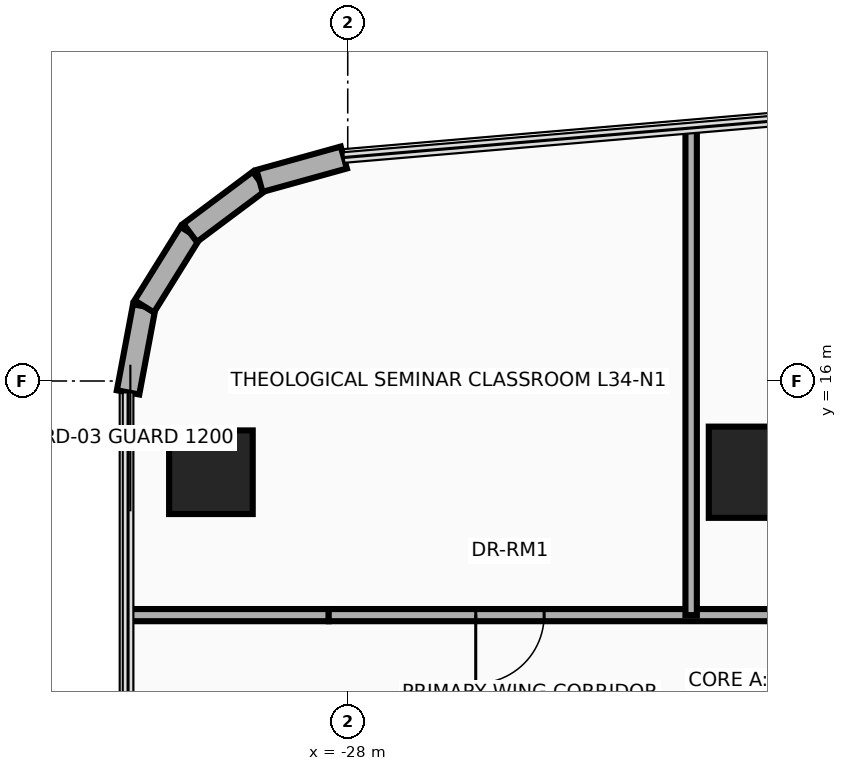
"""IFC4 building model, lengths in metres.
Left out: names, types, materials, properties, quantities, classifications, styles, units other than length and angle.
Written with IfcOpenShell. Run it as: python <this file> out.ifc"""

import sys

from ifc_helpers import new_model, si_unit, direction, frame, frame_2d, origin, origin_2d, place, context, subcontext, project, spatial, rectangle, circle, extrude, source, transform, mapped, element, fill, save


model = new_model("IFC4")
c1 = context("Model", 3, precision=1e-05, world=origin(), true_north=direction((0.0, 1.0)))
c2 = subcontext(c1, "Body", "Model", "MODEL_VIEW")
j1 = project(units=[si_unit("LENGTHUNIT", "METRE"), si_unit("PLANEANGLEUNIT", "RADIAN")], contexts=[c1])
p1 = place(None, origin())
s1 = spatial("IfcSite", under=j1, at=p1, CompositionType="ELEMENT")
p2 = place(p1, origin())
s2 = spatial("IfcBuilding", under=s1, at=p2, CompositionType="ELEMENT")
p3 = place(p2, frame((0.0, 0.0, 135.3)))
s3 = spatial("IfcBuildingStorey", under=s2, at=p3, CompositionType="ELEMENT", Elevation=135.3)
m1 = source(origin(), c2, "Body", "SweptSolid", [
    extrude(circle(Radius=0.55, at=origin_2d()), origin(), (0.0, 0.0, 1.0), 3.7),
])
p4 = place(p3, frame((-29.8, 14.8, 0.0), z_axis=(0.0, 0.0, 1.0), x_axis=(1.0, 0.0, 0.0)))
e1 = element("IfcColumn", 1, at=p4, inside=s3, PredefinedType="COLUMN", context=c2, shape_type="MappedRepresentation", body=[
    mapped(m1, transform((0.0, 0.0, 0.0), x_axis=(1.0, 0.0, 0.0), y_axis=(0.0, 1.0, 0.0), z_axis=(0.0, 0.0, 1.0), scale=1.0)),
])
m2 = source(origin(), c2, "Body", "SweptSolid", [
    extrude(rectangle(XDim=1.2, YDim=1.2, at=origin_2d()), origin(), (0.0, 0.0, 1.0), 3.7),
])
p5 = place(p3, frame((-22.65, 14.8, 0.0), z_axis=(0.0, 0.0, 1.0), x_axis=(1.0, 0.0, 0.0)))
e2 = element("IfcColumn", 2, at=p5, inside=s3, PredefinedType="COLUMN", context=c2, shape_type="MappedRepresentation", body=[
    mapped(m2, transform((0.0, 0.0, 0.0), x_axis=(1.0, 0.0, 0.0), y_axis=(0.0, 1.0, 0.0), z_axis=(0.0, 0.0, 1.0), scale=1.0)),
])
p6 = place(p3, frame((-30.89, 15.85, 0.0), z_axis=(0.0, 0.0, 1.0), x_axis=(0.184557499391, 0.982821718023, 0.0)))
e3 = element("IfcWall", 3, at=p6, inside=s3, PredefinedType="SOLIDWALL", context=c2, shape_type="SweptSolid", body=[
    extrude(rectangle(XDim=1.151, YDim=0.3, at=frame_2d((0.575, 0.0))), origin(), (0.0, 0.0, 1.0), 3.46),
])
p7 = place(p3, frame((-30.677, 16.981, 0.0), z_axis=(0.0, 0.0, 1.0), x_axis=(0.52880576008, 0.848742875143, 0.0)))
e4 = element("IfcWall", 4, at=p7, inside=s3, PredefinedType="SOLIDWALL", context=c2, shape_type="SweptSolid", body=[
    extrude(rectangle(XDim=1.141, YDim=0.3, at=frame_2d((0.57, 0.0))), origin(), (0.0, 0.0, 1.0), 3.46),
])
p8 = place(p3, frame((-30.074, 17.95, 0.0), z_axis=(0.0, 0.0, 1.0), x_axis=(0.800975009324, 0.598697782223, 0.0)))
e5 = element("IfcWall", 5, at=p8, inside=s3, PredefinedType="SOLIDWALL", context=c2, shape_type="SweptSolid", body=[
    extrude(rectangle(XDim=1.141, YDim=0.3, at=frame_2d((0.57, 0.0))), origin(), (0.0, 0.0, 1.0), 3.46),
])
p9 = place(p3, frame((-29.161, 18.633, 0.0), z_axis=(0.0, 0.0, 1.0), x_axis=(0.963624193367, 0.267260947313, 0.0)))
e6 = element("IfcWall", 6, at=p9, inside=s3, PredefinedType="SOLIDWALL", context=c2, shape_type="SweptSolid", body=[
    extrude(rectangle(XDim=1.151, YDim=0.3, at=frame_2d((0.575, 0.0))), origin(), (0.0, 0.0, 1.0), 3.46),
])
p10 = place(p3, frame((-30.89, 12.92, 0.0), z_axis=(0.0, 0.0, 1.0), x_axis=(1.0, 0.0, 0.0)))
e7 = element("IfcWall", 7, at=p10, inside=s3, PredefinedType="PARTITIONING", context=c2, shape_type="SweptSolid", body=[
    extrude(rectangle(XDim=2.64, YDim=0.16, at=frame_2d((1.32, 0.0))), origin(), (0.0, 0.0, 1.0), 2.896),
])
p11 = place(p3, frame((-28.25, 12.92, 0.0), z_axis=(0.0, 0.0, 1.0), x_axis=(1.0, 0.0, 0.0)))
e8 = element("IfcWall", 8, at=p11, inside=s3, PredefinedType="PARTITIONING", context=c2, shape_type="SweptSolid", body=[
    extrude(rectangle(XDim=41.8, YDim=0.16, at=frame_2d((20.9, 0.0))), origin(), (0.0, 0.0, 1.0), 2.666),
])
p12 = place(p11, frame((1.934, 0.0, 0.0)))
e9 = element("IfcOpeningElement", 9, at=p12, cuts=e8, PredefinedType="OPENING", context=c2, shape_type="SweptSolid", body=[
    extrude(rectangle(XDim=0.9, YDim=2.1, at=frame_2d((0.45, 1.05))), frame((0.0, 0.095, 0.0), z_axis=(0.0, -1.0, 0.0), x_axis=(1.0, 0.0, 0.0)), (0.0, 0.0, 1.0), 0.19),
])
p13 = place(p11, frame((8.497, 0.0, 0.0)))
e10 = element("IfcOpeningElement", 10, at=p13, cuts=e8, PredefinedType="OPENING", context=c2, shape_type="SweptSolid", body=[
    extrude(rectangle(XDim=1.8, YDim=2.15, at=frame_2d((0.9, 1.075))), frame((0.0, 0.095, 0.0), z_axis=(0.0, -1.0, 0.0), x_axis=(1.0, 0.0, 0.0)), (0.0, 0.0, 1.0), 0.19),
])
p14 = place(p11, frame((17.755, 0.0, 0.0)))
e11 = element("IfcOpeningElement", 11, at=p14, cuts=e8, PredefinedType="OPENING", context=c2, shape_type="SweptSolid", body=[
    extrude(rectangle(XDim=1.8, YDim=2.15, at=frame_2d((0.9, 1.075))), frame((0.0, 0.095, 0.0), z_axis=(0.0, -1.0, 0.0), x_axis=(1.0, 0.0, 0.0)), (0.0, 0.0, 1.0), 0.19),
])
p15 = place(p11, frame((27.013, 0.0, 0.0)))
e12 = element("IfcOpeningElement", 12, at=p15, cuts=e8, PredefinedType="OPENING", context=c2, shape_type="SweptSolid", body=[
    extrude(rectangle(XDim=1.8, YDim=2.15, at=frame_2d((0.9, 1.075))), frame((0.0, 0.095, 0.0), z_axis=(0.0, -1.0, 0.0), x_axis=(1.0, 0.0, 0.0)), (0.0, 0.0, 1.0), 0.19),
])
p16 = place(p11, frame((36.271, 0.0, 0.0)))
e13 = element("IfcOpeningElement", 13, at=p16, cuts=e8, PredefinedType="OPENING", context=c2, shape_type="SweptSolid", body=[
    extrude(rectangle(XDim=1.8, YDim=2.15, at=frame_2d((0.9, 1.075))), frame((0.0, 0.095, 0.0), z_axis=(0.0, -1.0, 0.0), x_axis=(1.0, 0.0, 0.0)), (0.0, 0.0, 1.0), 0.19),
])
p17 = place(p3, frame((-23.482, 12.92, 0.0), z_axis=(0.0, 0.0, 1.0), x_axis=(0.0, 1.0, 0.0)))
e14 = element("IfcWall", 14, at=p17, inside=s3, PredefinedType="PARTITIONING", context=c2, shape_type="SweptSolid", body=[
    extrude(rectangle(XDim=6.409, YDim=0.15, at=frame_2d((3.204, 0.0))), origin(), (0.0, 0.0, 1.0), 2.666),
])
p18 = place(p12, frame((0.9, 0.0, 0.0), z_axis=(0.0, 0.0, 1.0), x_axis=(-1.0, 0.0, 0.0)))
e15 = element("IfcDoor", 15, at=p18, inside=s3, OperationType="SINGLE_SWING_LEFT", PredefinedType="DOOR", context=c2, shape_type="SweptSolid", body=[
    extrude(rectangle(XDim=0.9, YDim=2.1, at=frame_2d((0.45, 1.05))), frame((0.0, 0.025, 0.0), z_axis=(0.0, -1.0, 0.0), x_axis=(1.0, 0.0, 0.0)), (0.0, 0.0, 1.0), 0.05),
])
fill(e9, e15)
save(model, sys.argv[1])
